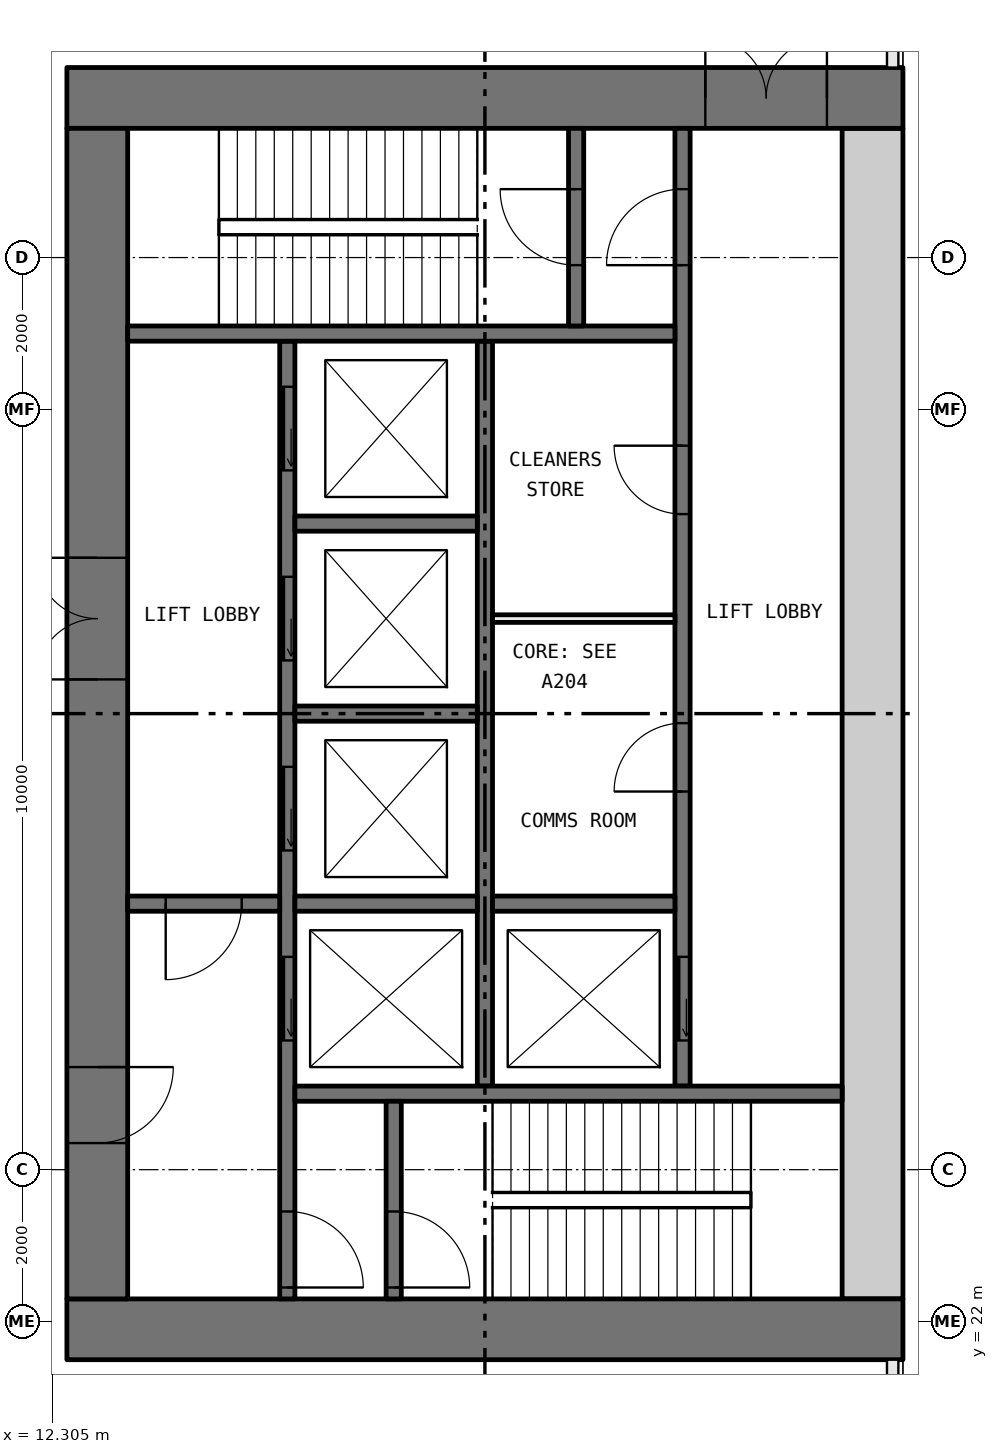
"""IFC4 building model, lengths in metres.
Left out: names, types, materials, properties, quantities, classifications, styles, units other than length and angle.
Written with IfcOpenShell. Run it as: python <this file> out.ifc"""

import sys

from ifc_helpers import new_model, si_unit, direction, frame, frame_2d, origin, place, context, subcontext, project, spatial, rectangle, extrude, element, fill, save


model = new_model("IFC4")
c1 = context("Model", 3, precision=1e-05, world=origin(), true_north=direction((0.0, 1.0)))
c2 = subcontext(c1, "Body", "Model", "MODEL_VIEW")
j1 = project(units=[si_unit("LENGTHUNIT", "METRE"), si_unit("PLANEANGLEUNIT", "RADIAN")], contexts=[c1])
p1 = place(None, origin())
s1 = spatial("IfcSite", under=j1, at=p1, CompositionType="ELEMENT")
p2 = place(p1, origin())
s2 = spatial("IfcBuilding", under=s1, at=p2, CompositionType="ELEMENT")
p3 = place(p2, frame((0.0, 0.0, 18.0)))
s3 = spatial("IfcBuildingStorey", under=s2, at=p3, CompositionType="ELEMENT", Elevation=18.0)
p4 = place(p3, frame((12.5, 21.9, 0.0), z_axis=(0.0, 0.0, 1.0), x_axis=(1.0, 0.0, 0.0)))
e1 = element("IfcWall", 1, at=p4, inside=s3, PredefinedType="SHEAR", context=c2, shape_type="SweptSolid", body=[
    extrude(rectangle(XDim=11.0, YDim=0.8, at=frame_2d((5.5, 0.0))), origin(), (0.0, 0.0, 1.0), 5.6),
])
p5 = place(p3, frame((12.5, 38.1, 0.0), z_axis=(0.0, 0.0, 1.0), x_axis=(1.0, 0.0, 0.0)))
e2 = element("IfcWall", 2, at=p5, inside=s3, PredefinedType="SHEAR", context=c2, shape_type="SweptSolid", body=[
    extrude(rectangle(XDim=11.0, YDim=0.8, at=frame_2d((5.5, 0.0))), origin(), (0.0, 0.0, 1.0), 5.6),
])
p6 = place(p5, frame((8.4, 0.0, 0.0)))
e3 = element("IfcOpeningElement", 3, at=p6, cuts=e2, PredefinedType="OPENING", context=c2, shape_type="SweptSolid", body=[
    extrude(rectangle(XDim=1.6, YDim=2.1, at=frame_2d((0.8, 1.05))), frame((0.0, 0.41, 0.0), z_axis=(0.0, -1.0, 0.0), x_axis=(1.0, 0.0, 0.0)), (0.0, 0.0, 1.0), 0.82),
])
p7 = place(p3, frame((12.9, 22.3, 0.0), z_axis=(0.0, 0.0, 1.0), x_axis=(0.0, 1.0, 0.0)))
e4 = element("IfcWall", 4, at=p7, inside=s3, PredefinedType="SHEAR", context=c2, shape_type="SweptSolid", body=[
    extrude(rectangle(XDim=15.4, YDim=0.8, at=frame_2d((7.7, 0.0))), origin(), (0.0, 0.0, 1.0), 5.6),
])
p8 = place(p7, frame((8.15, 0.0, 0.0)))
e5 = element("IfcOpeningElement", 5, at=p8, cuts=e4, PredefinedType="OPENING", context=c2, shape_type="SweptSolid", body=[
    extrude(rectangle(XDim=1.6, YDim=2.1, at=frame_2d((0.8, 1.05))), frame((0.0, 0.41, 0.0), z_axis=(0.0, -1.0, 0.0), x_axis=(1.0, 0.0, 0.0)), (0.0, 0.0, 1.0), 0.82),
])
p9 = place(p7, frame((2.05, 0.0, 0.0)))
e6 = element("IfcOpeningElement", 6, at=p9, cuts=e4, PredefinedType="OPENING", context=c2, shape_type="SweptSolid", body=[
    extrude(rectangle(XDim=1.0, YDim=2.1, at=frame_2d((0.5, 1.05))), frame((0.0, 0.41, 0.0), z_axis=(0.0, -1.0, 0.0), x_axis=(1.0, 0.0, 0.0)), (0.0, 0.0, 1.0), 0.82),
])
p10 = place(p3, frame((23.1, 22.3, 0.0), z_axis=(0.0, 0.0, 1.0), x_axis=(0.0, 1.0, 0.0)))
e7 = element("IfcWall", 7, at=p10, inside=s3, PredefinedType="SHEAR", context=c2, shape_type="SweptSolid", body=[
    extrude(rectangle(XDim=15.4, YDim=0.8, at=frame_2d((7.7, 0.0))), origin(), (0.0, 0.0, 1.0), 5.6),
])
p11 = place(p3, frame((15.4, 22.3, 0.0), z_axis=(0.0, 0.0, 1.0), x_axis=(0.0, 1.0, 0.0)))
e8 = element("IfcWall", 8, at=p11, inside=s3, PredefinedType="SOLIDWALL", context=c2, shape_type="SweptSolid", body=[
    extrude(rectangle(XDim=12.6, YDim=0.2, at=frame_2d((6.3, 0.0))), origin(), (0.0, 0.0, 1.0), 5.6),
])
p12 = place(p11, frame((3.4, 0.0, 0.0)))
e9 = element("IfcOpeningElement", 9, at=p12, cuts=e8, PredefinedType="OPENING", context=c2, shape_type="SweptSolid", body=[
    extrude(rectangle(XDim=1.1, YDim=2.1, at=frame_2d((0.55, 1.05))), frame((0.0, 0.11, 0.0), z_axis=(0.0, -1.0, 0.0), x_axis=(1.0, 0.0, 0.0)), (0.0, 0.0, 1.0), 0.22),
])
p13 = place(p11, frame((5.9, 0.0, 0.0)))
e10 = element("IfcOpeningElement", 10, at=p13, cuts=e8, PredefinedType="OPENING", context=c2, shape_type="SweptSolid", body=[
    extrude(rectangle(XDim=1.1, YDim=2.1, at=frame_2d((0.55, 1.05))), frame((0.0, 0.11, 0.0), z_axis=(0.0, -1.0, 0.0), x_axis=(1.0, 0.0, 0.0)), (0.0, 0.0, 1.0), 0.22),
])
p14 = place(p11, frame((8.4, 0.0, 0.0)))
e11 = element("IfcOpeningElement", 11, at=p14, cuts=e8, PredefinedType="OPENING", context=c2, shape_type="SweptSolid", body=[
    extrude(rectangle(XDim=1.1, YDim=2.1, at=frame_2d((0.55, 1.05))), frame((0.0, 0.11, 0.0), z_axis=(0.0, -1.0, 0.0), x_axis=(1.0, 0.0, 0.0)), (0.0, 0.0, 1.0), 0.22),
])
p15 = place(p11, frame((10.9, 0.0, 0.0)))
e12 = element("IfcOpeningElement", 12, at=p15, cuts=e8, PredefinedType="OPENING", context=c2, shape_type="SweptSolid", body=[
    extrude(rectangle(XDim=1.1, YDim=2.1, at=frame_2d((0.55, 1.05))), frame((0.0, 0.11, 0.0), z_axis=(0.0, -1.0, 0.0), x_axis=(1.0, 0.0, 0.0)), (0.0, 0.0, 1.0), 0.22),
])
p16 = place(p11, frame((0.15, 0.0, 0.0)))
e13 = element("IfcOpeningElement", 13, at=p16, cuts=e8, PredefinedType="OPENING", context=c2, shape_type="SweptSolid", body=[
    extrude(rectangle(XDim=1.0, YDim=2.1, at=frame_2d((0.5, 1.05))), frame((0.0, 0.11, 0.0), z_axis=(0.0, -1.0, 0.0), x_axis=(1.0, 0.0, 0.0)), (0.0, 0.0, 1.0), 0.22),
])
p17 = place(p3, frame((20.6, 25.1, 0.0), z_axis=(0.0, 0.0, 1.0), x_axis=(0.0, 1.0, 0.0)))
e14 = element("IfcWall", 14, at=p17, inside=s3, PredefinedType="SOLIDWALL", context=c2, shape_type="SweptSolid", body=[
    extrude(rectangle(XDim=12.6, YDim=0.2, at=frame_2d((6.3, 0.0))), origin(), (0.0, 0.0, 1.0), 5.6),
])
p18 = place(p17, frame((0.6, 0.0, 0.0)))
e15 = element("IfcOpeningElement", 15, at=p18, cuts=e14, PredefinedType="OPENING", context=c2, shape_type="SweptSolid", body=[
    extrude(rectangle(XDim=1.1, YDim=2.1, at=frame_2d((0.55, 1.05))), frame((0.0, 0.11, 0.0), z_axis=(0.0, -1.0, 0.0), x_axis=(1.0, 0.0, 0.0)), (0.0, 0.0, 1.0), 0.22),
])
p19 = place(p17, frame((10.8, 0.0, 0.0)))
e16 = element("IfcOpeningElement", 16, at=p19, cuts=e14, PredefinedType="OPENING", context=c2, shape_type="SweptSolid", body=[
    extrude(rectangle(XDim=1.0, YDim=2.1, at=frame_2d((0.5, 1.05))), frame((0.0, 0.11, 0.0), z_axis=(0.0, -1.0, 0.0), x_axis=(1.0, 0.0, 0.0)), (0.0, 0.0, 1.0), 0.22),
])
p20 = place(p17, frame((3.875, 0.0, 0.0)))
e17 = element("IfcOpeningElement", 17, at=p20, cuts=e14, PredefinedType="OPENING", context=c2, shape_type="SweptSolid", body=[
    extrude(rectangle(XDim=0.9, YDim=2.1, at=frame_2d((0.45, 1.05))), frame((0.0, 0.11, 0.0), z_axis=(0.0, -1.0, 0.0), x_axis=(1.0, 0.0, 0.0)), (0.0, 0.0, 1.0), 0.22),
])
p21 = place(p17, frame((7.525, 0.0, 0.0)))
e18 = element("IfcOpeningElement", 18, at=p21, cuts=e14, PredefinedType="OPENING", context=c2, shape_type="SweptSolid", body=[
    extrude(rectangle(XDim=0.9, YDim=2.1, at=frame_2d((0.45, 1.05))), frame((0.0, 0.11, 0.0), z_axis=(0.0, -1.0, 0.0), x_axis=(1.0, 0.0, 0.0)), (0.0, 0.0, 1.0), 0.22),
])
p22 = place(p3, frame((18.0, 25.1, 0.0), z_axis=(0.0, 0.0, 1.0), x_axis=(0.0, 1.0, 0.0)))
e19 = element("IfcWall", 19, at=p22, inside=s3, PredefinedType="SOLIDWALL", context=c2, shape_type="SweptSolid", body=[
    extrude(rectangle(XDim=9.8, YDim=0.2, at=frame_2d((4.9, 0.0))), origin(), (0.0, 0.0, 1.0), 5.6),
])
for number, where, z_axis, x_axis in (
    (20, (15.5, 25.0, 0.0), (0.0, 0.0, 1.0), (1.0, 0.0, 0.0)),
    (21, (13.3, 35.0, 0.0), (0.0, 0.0, 1.0), (1.0, 0.0, 0.0)),
):
    element("IfcWall", number, at=place(p3, frame(where, z_axis=z_axis, x_axis=x_axis)), inside=s3, PredefinedType="SOLIDWALL", context=c2, shape_type="SweptSolid", body=[
        extrude(rectangle(XDim=7.2, YDim=0.2, at=frame_2d((3.6, 0.0))), origin(), (0.0, 0.0, 1.0), 5.6),
    ])
p23 = place(p3, frame((13.3, 27.5, 0.0), z_axis=(0.0, 0.0, 1.0), x_axis=(1.0, 0.0, 0.0)))
e22 = element("IfcWall", 22, at=p23, inside=s3, PredefinedType="SOLIDWALL", context=c2, shape_type="SweptSolid", body=[
    extrude(rectangle(XDim=2.0, YDim=0.2, at=frame_2d((1.0, 0.0))), origin(), (0.0, 0.0, 1.0), 5.6),
])
p24 = place(p23, frame((0.5, 0.0, 0.0)))
e23 = element("IfcOpeningElement", 23, at=p24, cuts=e22, PredefinedType="OPENING", context=c2, shape_type="SweptSolid", body=[
    extrude(rectangle(XDim=1.0, YDim=2.1, at=frame_2d((0.5, 1.05))), frame((0.0, 0.11, 0.0), z_axis=(0.0, -1.0, 0.0), x_axis=(1.0, 0.0, 0.0)), (0.0, 0.0, 1.0), 0.22),
])
p25 = place(p3, frame((16.8, 22.3, 0.0), z_axis=(0.0, 0.0, 1.0), x_axis=(0.0, 1.0, 0.0)))
e24 = element("IfcWall", 24, at=p25, inside=s3, PredefinedType="SOLIDWALL", context=c2, shape_type="SweptSolid", body=[
    extrude(rectangle(XDim=2.6, YDim=0.2, at=frame_2d((1.3, 0.0))), origin(), (0.0, 0.0, 1.0), 5.6),
])
p26 = place(p25, frame((0.15, 0.0, 0.0)))
e25 = element("IfcOpeningElement", 25, at=p26, cuts=e24, PredefinedType="OPENING", context=c2, shape_type="SweptSolid", body=[
    extrude(rectangle(XDim=1.0, YDim=2.1, at=frame_2d((0.5, 1.05))), frame((0.0, 0.11, 0.0), z_axis=(0.0, -1.0, 0.0), x_axis=(1.0, 0.0, 0.0)), (0.0, 0.0, 1.0), 0.22),
])
p27 = place(p3, frame((19.2, 35.1, 0.0), z_axis=(0.0, 0.0, 1.0), x_axis=(0.0, 1.0, 0.0)))
e26 = element("IfcWall", 26, at=p27, inside=s3, PredefinedType="SOLIDWALL", context=c2, shape_type="SweptSolid", body=[
    extrude(rectangle(XDim=2.6, YDim=0.2, at=frame_2d((1.3, 0.0))), origin(), (0.0, 0.0, 1.0), 5.6),
])
p28 = place(p27, frame((0.8, 0.0, 0.0)))
e27 = element("IfcOpeningElement", 27, at=p28, cuts=e26, PredefinedType="OPENING", context=c2, shape_type="SweptSolid", body=[
    extrude(rectangle(XDim=1.0, YDim=2.1, at=frame_2d((0.5, 1.05))), frame((0.0, 0.11, 0.0), z_axis=(0.0, -1.0, 0.0), x_axis=(1.0, 0.0, 0.0)), (0.0, 0.0, 1.0), 0.22),
])
for number, where, z_axis, x_axis in (
    (28, (15.5, 27.5, 0.0), (0.0, 0.0, 1.0), (1.0, 0.0, 0.0)),
    (29, (15.5, 30.0, 0.0), (0.0, 0.0, 1.0), (1.0, 0.0, 0.0)),
    (30, (15.5, 32.5, 0.0), (0.0, 0.0, 1.0), (1.0, 0.0, 0.0)),
    (31, (18.1, 27.5, 0.0), (0.0, 0.0, 1.0), (1.0, 0.0, 0.0)),
):
    element("IfcWall", number, at=place(p3, frame(where, z_axis=z_axis, x_axis=x_axis)), inside=s3, PredefinedType="SOLIDWALL", context=c2, shape_type="SweptSolid", body=[
        extrude(rectangle(XDim=2.4, YDim=0.2, at=frame_2d((1.2, 0.0))), origin(), (0.0, 0.0, 1.0), 5.6),
    ])
p29 = place(p3, frame((18.1, 31.25, 0.0), z_axis=(0.0, 0.0, 1.0), x_axis=(1.0, 0.0, 0.0)))
e32 = element("IfcWall", 32, at=p29, inside=s3, PredefinedType="PARTITIONING", context=c2, shape_type="SweptSolid", body=[
    extrude(rectangle(XDim=2.4, YDim=0.1, at=frame_2d((1.2, 0.0))), origin(), (0.0, 0.0, 1.0), 5.6),
])
p30 = place(p18, origin())
e33 = element("IfcDoor", 33, at=p30, inside=s3, OperationType="SLIDING_TO_LEFT", PredefinedType="DOOR", context=c2, shape_type="SweptSolid", body=[
    extrude(rectangle(XDim=1.1, YDim=2.1, at=frame_2d((0.55, 1.05))), frame((0.0, 0.025, 0.0), z_axis=(0.0, -1.0, 0.0), x_axis=(1.0, 0.0, 0.0)), (0.0, 0.0, 1.0), 0.05),
])
fill(e15, e33)
p31 = place(p12, origin())
e34 = element("IfcDoor", 34, at=p31, inside=s3, OperationType="SLIDING_TO_LEFT", PredefinedType="DOOR", context=c2, shape_type="SweptSolid", body=[
    extrude(rectangle(XDim=1.1, YDim=2.1, at=frame_2d((0.55, 1.05))), frame((0.0, 0.025, 0.0), z_axis=(0.0, -1.0, 0.0), x_axis=(1.0, 0.0, 0.0)), (0.0, 0.0, 1.0), 0.05),
])
fill(e9, e34)
p32 = place(p13, origin())
e35 = element("IfcDoor", 35, at=p32, inside=s3, OperationType="SLIDING_TO_LEFT", PredefinedType="DOOR", context=c2, shape_type="SweptSolid", body=[
    extrude(rectangle(XDim=1.1, YDim=2.1, at=frame_2d((0.55, 1.05))), frame((0.0, 0.025, 0.0), z_axis=(0.0, -1.0, 0.0), x_axis=(1.0, 0.0, 0.0)), (0.0, 0.0, 1.0), 0.05),
])
fill(e10, e35)
p33 = place(p14, origin())
e36 = element("IfcDoor", 36, at=p33, inside=s3, OperationType="SLIDING_TO_LEFT", PredefinedType="DOOR", context=c2, shape_type="SweptSolid", body=[
    extrude(rectangle(XDim=1.1, YDim=2.1, at=frame_2d((0.55, 1.05))), frame((0.0, 0.025, 0.0), z_axis=(0.0, -1.0, 0.0), x_axis=(1.0, 0.0, 0.0)), (0.0, 0.0, 1.0), 0.05),
])
fill(e11, e36)
p34 = place(p15, origin())
e37 = element("IfcDoor", 37, at=p34, inside=s3, OperationType="SLIDING_TO_LEFT", PredefinedType="DOOR", context=c2, shape_type="SweptSolid", body=[
    extrude(rectangle(XDim=1.1, YDim=2.1, at=frame_2d((0.55, 1.05))), frame((0.0, 0.025, 0.0), z_axis=(0.0, -1.0, 0.0), x_axis=(1.0, 0.0, 0.0)), (0.0, 0.0, 1.0), 0.05),
])
fill(e12, e37)
p35 = place(p26, frame((1.0, 0.0, 0.0), x_axis=(-1.0, 0.0, 0.0)))
e38 = element("IfcDoor", 38, at=p35, inside=s3, OperationType="SINGLE_SWING_LEFT", PredefinedType="DOOR", context=c2, shape_type="SweptSolid", body=[
    extrude(rectangle(XDim=1.0, YDim=2.1, at=frame_2d((0.5, 1.05))), frame((0.0, 0.025, 0.0), z_axis=(0.0, -1.0, 0.0), x_axis=(1.0, 0.0, 0.0)), (0.0, 0.0, 1.0), 0.05),
])
fill(e25, e38)
p36 = place(p16, frame((1.0, 0.0, 0.0), x_axis=(-1.0, 0.0, 0.0)))
e39 = element("IfcDoor", 39, at=p36, inside=s3, OperationType="SINGLE_SWING_LEFT", PredefinedType="DOOR", context=c2, shape_type="SweptSolid", body=[
    extrude(rectangle(XDim=1.0, YDim=2.1, at=frame_2d((0.5, 1.05))), frame((0.0, 0.025, 0.0), z_axis=(0.0, -1.0, 0.0), x_axis=(1.0, 0.0, 0.0)), (0.0, 0.0, 1.0), 0.05),
])
fill(e13, e39)
p37 = place(p19, origin())
e40 = element("IfcDoor", 40, at=p37, inside=s3, OperationType="SINGLE_SWING_RIGHT", PredefinedType="DOOR", context=c2, shape_type="SweptSolid", body=[
    extrude(rectangle(XDim=1.0, YDim=2.1, at=frame_2d((0.5, 1.05))), frame((0.0, 0.025, 0.0), z_axis=(0.0, -1.0, 0.0), x_axis=(1.0, 0.0, 0.0)), (0.0, 0.0, 1.0), 0.05),
])
fill(e16, e40)
p38 = place(p28, origin())
e41 = element("IfcDoor", 41, at=p38, inside=s3, OperationType="SINGLE_SWING_LEFT", PredefinedType="DOOR", context=c2, shape_type="SweptSolid", body=[
    extrude(rectangle(XDim=1.0, YDim=2.1, at=frame_2d((0.5, 1.05))), frame((0.0, 0.025, 0.0), z_axis=(0.0, -1.0, 0.0), x_axis=(1.0, 0.0, 0.0)), (0.0, 0.0, 1.0), 0.05),
])
fill(e27, e41)
p39 = place(p24, frame((1.0, 0.0, 0.0), x_axis=(-1.0, 0.0, 0.0)))
e42 = element("IfcDoor", 42, at=p39, inside=s3, OperationType="SINGLE_SWING_LEFT", PredefinedType="DOOR", context=c2, shape_type="SweptSolid", body=[
    extrude(rectangle(XDim=1.0, YDim=2.1, at=frame_2d((0.5, 1.05))), frame((0.0, 0.025, 0.0), z_axis=(0.0, -1.0, 0.0), x_axis=(1.0, 0.0, 0.0)), (0.0, 0.0, 1.0), 0.05),
])
fill(e23, e42)
p40 = place(p8, origin())
e43 = element("IfcDoor", 43, at=p40, inside=s3, OperationType="DOUBLE_DOOR_SINGLE_SWING", PredefinedType="DOOR", context=c2, shape_type="SweptSolid", body=[
    extrude(rectangle(XDim=1.6, YDim=2.1, at=frame_2d((0.8, 1.05))), frame((0.0, 0.025, 0.0), z_axis=(0.0, -1.0, 0.0), x_axis=(1.0, 0.0, 0.0)), (0.0, 0.0, 1.0), 0.05),
])
fill(e5, e43)
p41 = place(p9, frame((1.0, 0.0, 0.0), x_axis=(-1.0, 0.0, 0.0)))
e44 = element("IfcDoor", 44, at=p41, inside=s3, OperationType="SINGLE_SWING_RIGHT", PredefinedType="DOOR", context=c2, shape_type="SweptSolid", body=[
    extrude(rectangle(XDim=1.0, YDim=2.1, at=frame_2d((0.5, 1.05))), frame((0.0, 0.025, 0.0), z_axis=(0.0, -1.0, 0.0), x_axis=(1.0, 0.0, 0.0)), (0.0, 0.0, 1.0), 0.05),
])
fill(e6, e44)
p42 = place(p6, origin())
e45 = element("IfcDoor", 45, at=p42, inside=s3, OperationType="DOUBLE_DOOR_SINGLE_SWING", PredefinedType="DOOR", context=c2, shape_type="SweptSolid", body=[
    extrude(rectangle(XDim=1.6, YDim=2.1, at=frame_2d((0.8, 1.05))), frame((0.0, 0.025, 0.0), z_axis=(0.0, -1.0, 0.0), x_axis=(1.0, 0.0, 0.0)), (0.0, 0.0, 1.0), 0.05),
])
fill(e3, e45)
p43 = place(p20, origin())
e46 = element("IfcDoor", 46, at=p43, inside=s3, OperationType="SINGLE_SWING_RIGHT", PredefinedType="DOOR", context=c2, shape_type="SweptSolid", body=[
    extrude(rectangle(XDim=0.9, YDim=2.1, at=frame_2d((0.45, 1.05))), frame((0.0, 0.025, 0.0), z_axis=(0.0, -1.0, 0.0), x_axis=(1.0, 0.0, 0.0)), (0.0, 0.0, 1.0), 0.05),
])
fill(e17, e46)
p44 = place(p21, origin())
e47 = element("IfcDoor", 47, at=p44, inside=s3, OperationType="SINGLE_SWING_LEFT", PredefinedType="DOOR", context=c2, shape_type="SweptSolid", body=[
    extrude(rectangle(XDim=0.9, YDim=2.1, at=frame_2d((0.45, 1.05))), frame((0.0, 0.025, 0.0), z_axis=(0.0, -1.0, 0.0), x_axis=(1.0, 0.0, 0.0)), (0.0, 0.0, 1.0), 0.05),
])
fill(e18, e47)
save(model, sys.argv[1])
